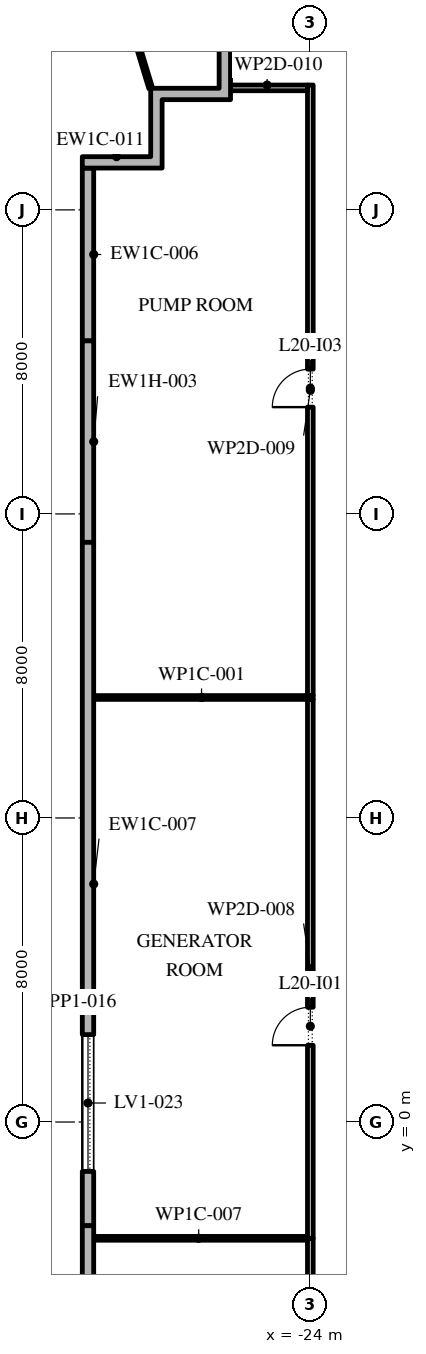
"""IFC4 building model, lengths in metres.
Left out: names, types, materials, properties, quantities, classifications, styles, units other than length and angle.
Written with IfcOpenShell. Run it as: python <this file> out.ifc"""

import sys

from ifc_helpers import new_model, si_unit, direction, frame, frame_2d, origin, place, context, subcontext, project, spatial, polyline, rectangle, outline, extrude, element, fill, save


model = new_model("IFC4")
c1 = context("Model", 3, precision=1e-05, world=origin(), true_north=direction((0.0, 1.0)))
c2 = subcontext(c1, "Body", "Model", "MODEL_VIEW")
j1 = project(units=[si_unit("LENGTHUNIT", "METRE"), si_unit("PLANEANGLEUNIT", "RADIAN")], contexts=[c1])
p1 = place(None, origin())
s1 = spatial("IfcSite", under=j1, at=p1, CompositionType="ELEMENT")
p2 = place(p1, origin())
s2 = spatial("IfcBuilding", under=s1, at=p2, CompositionType="ELEMENT")
p3 = place(p2, frame((0.0, 0.0, 94.2)))
s3 = spatial("IfcBuildingStorey", under=s2, at=p3, CompositionType="ELEMENT", Elevation=94.2)
p4 = place(p3, frame((-29.85, 25.1, 0.0), z_axis=(0.0, 0.0, 1.0), x_axis=(0.0, -1.0, 0.0)))
e1 = element("IfcWall", 1, at=p4, inside=s3, PredefinedType="STANDARD", context=c2, shape_type="SweptSolid", body=[
    extrude(rectangle(XDim=4.547, YDim=0.3, at=frame_2d((2.273, 0.0))), origin(), (0.0, 0.0, 1.0), 4.95),
])
p5 = place(p3, origin())
e2 = element("IfcWall", 2, at=p5, inside=s3, PredefinedType="STANDARD", context=c2, shape_type="SweptSolid", body=[
    extrude(outline(polyline([(-28.2, 25.4), (-28.2, 27.2), (-26.4, 27.2), (-26.4, 28.7), (-26.1, 28.7), (-26.1, 26.9), (-27.9, 26.9), (-27.9, 25.1), (-30.0, 25.1), (-30.0, 25.4), (-28.2, 25.4)])), origin(), (0.0, 0.0, 1.0), 4.95),
])
p6 = place(p3, frame((-28.2, 27.2, -0.05), z_axis=(0.0, 0.0, 1.0), x_axis=(-0.29036881155, 0.956914809834, 0.0)))
e3 = element("IfcWall", 3, at=p6, inside=s3, PredefinedType="STANDARD", context=c2, shape_type="SweptSolid", body=[
    extrude(rectangle(XDim=7.255, YDim=0.1, at=frame_2d((3.627, 0.0))), origin(), (0.0, 0.0, 1.0), 5.0),
])
p7 = place(p3, frame((-29.8, 11.17, 0.0), z_axis=(0.0, 0.0, 1.0), x_axis=(1.0, 0.0, 0.0)))
e4 = element("IfcWall", 4, at=p7, inside=s3, PredefinedType="PARTITIONING", context=c2, shape_type="SweptSolid", body=[
    extrude(rectangle(XDim=5.875, YDim=0.1, at=frame_2d((2.938, 0.0))), origin(), (0.0, 0.0, 1.0), 4.95),
])
p8 = place(p3, frame((-24.0, -10.12, 0.0), z_axis=(0.0, 0.0, 1.0), x_axis=(0.0, 1.0, 0.0)))
e5 = element("IfcWall", 5, at=p8, inside=s3, PredefinedType="PARTITIONING", context=c2, shape_type="SweptSolid", body=[
    extrude(rectangle(XDim=7.06, YDim=0.15, at=frame_2d((3.53, 0.0))), origin(), (0.0, 0.0, 1.0), 4.95),
])
p9 = place(p8, frame((1.66, 0.0, 0.0)))
e6 = element("IfcOpeningElement", 6, at=p9, cuts=e5, PredefinedType="OPENING", context=c2, shape_type="SweptSolid", body=[
    extrude(rectangle(XDim=1.0, YDim=2.1, at=frame_2d((0.5, 1.05))), frame((0.0, 0.085, 0.0), z_axis=(0.0, -1.0, 0.0), x_axis=(1.0, 0.0, 0.0)), (0.0, 0.0, 1.0), 0.17),
])
p10 = place(p3, frame((-24.075, -3.06, 0.0), z_axis=(0.0, 0.0, 1.0), x_axis=(-1.0, 0.0, 0.0)))
e7 = element("IfcWall", 7, at=p10, inside=s3, PredefinedType="PARTITIONING", context=c2, shape_type="SweptSolid", body=[
    extrude(rectangle(XDim=5.725, YDim=0.1, at=frame_2d((2.863, 0.0))), origin(), (0.0, 0.0, 1.0), 4.95),
])
p11 = place(p3, frame((-24.0, -3.06, 0.0), z_axis=(0.0, 0.0, 1.0), x_axis=(0.0, 1.0, 0.0)))
e8 = element("IfcWall", 8, at=p11, inside=s3, PredefinedType="PARTITIONING", context=c2, shape_type="SweptSolid", body=[
    extrude(rectangle(XDim=14.18, YDim=0.15, at=frame_2d((7.09, 0.0))), origin(), (0.0, 0.0, 1.0), 4.95),
])
p12 = place(p11, frame((5.08, 0.0, 0.0)))
e9 = element("IfcOpeningElement", 9, at=p12, cuts=e8, PredefinedType="OPENING", context=c2, shape_type="SweptSolid", body=[
    extrude(rectangle(XDim=1.0, YDim=2.1, at=frame_2d((0.5, 1.05))), frame((0.0, 0.085, 0.0), z_axis=(0.0, -1.0, 0.0), x_axis=(1.0, 0.0, 0.0)), (0.0, 0.0, 1.0), 0.17),
])
p13 = place(p3, frame((-24.0, 11.22, 0.0), z_axis=(0.0, 0.0, 1.0), x_axis=(0.0, 1.0, 0.0)))
e10 = element("IfcWall", 10, at=p13, inside=s3, PredefinedType="PARTITIONING", context=c2, shape_type="SweptSolid", body=[
    extrude(rectangle(XDim=16.065, YDim=0.15, at=frame_2d((8.032, 0.0))), origin(), (0.0, 0.0, 1.0), 4.95),
])
p14 = place(p13, frame((7.59, 0.0, 0.0)))
e11 = element("IfcOpeningElement", 11, at=p14, cuts=e10, PredefinedType="OPENING", context=c2, shape_type="SweptSolid", body=[
    extrude(rectangle(XDim=1.0, YDim=2.1, at=frame_2d((0.5, 1.05))), frame((0.0, 0.085, 0.0), z_axis=(0.0, -1.0, 0.0), x_axis=(1.0, 0.0, 0.0)), (0.0, 0.0, 1.0), 0.17),
])
p15 = place(p3, frame((-24.075, 27.21, 0.0), z_axis=(0.0, 0.0, 1.0), x_axis=(-1.0, 0.0, 0.0)))
e12 = element("IfcWall", 12, at=p15, inside=s3, PredefinedType="PARTITIONING", context=c2, shape_type="SweptSolid", body=[
    extrude(rectangle(XDim=2.125, YDim=0.15, at=frame_2d((1.062, 0.0))), origin(), (0.0, 0.0, 1.0), 4.95),
])
p16 = place(p3, frame((-29.85, 20.553, 0.0), z_axis=(0.0, 0.0, 1.0), x_axis=(0.0, -1.0, 0.0)))
e13 = element("IfcWall", 13, at=p16, inside=s3, PredefinedType="STANDARD", context=c2, shape_type="SweptSolid", body=[
    extrude(rectangle(XDim=5.301, YDim=0.3, at=frame_2d((2.65, 0.0))), origin(), (0.0, 0.0, 1.0), 4.05),
])
p17 = place(p3, frame((-29.85, 15.252, 0.0), z_axis=(0.0, 0.0, 1.0), x_axis=(0.0, -1.0, 0.0)))
e14 = element("IfcWall", 14, at=p17, inside=s3, PredefinedType="STANDARD", context=c2, shape_type="SweptSolid", body=[
    extrude(rectangle(XDim=17.981, YDim=0.3, at=frame_2d((8.99, 0.0))), origin(), (0.0, 0.0, 1.0), 4.95),
])
p18 = place(p17, frame((12.952, 0.0, 0.6)))
e15 = element("IfcOpeningElement", 15, at=p18, cuts=e14, PredefinedType="OPENING", context=c2, shape_type="SweptSolid", body=[
    extrude(rectangle(XDim=3.6, YDim=3.9, at=frame_2d((1.8, 1.95))), frame((0.0, 0.16, 0.0), z_axis=(0.0, -1.0, 0.0), x_axis=(1.0, 0.0, 0.0)), (0.0, 0.0, 1.0), 0.32),
])
p19 = place(p3, frame((-29.85, -2.729, 0.0), z_axis=(0.0, 0.0, 1.0), x_axis=(0.0, -1.0, 0.0)))
e16 = element("IfcWall", 16, at=p19, inside=s3, PredefinedType="STANDARD", context=c2, shape_type="SweptSolid", body=[
    extrude(rectangle(XDim=15.104, YDim=0.3, at=frame_2d((7.552, 0.0))), origin(), (0.0, 0.0, 1.0), 4.196),
])
p20 = place(p19, frame((2.086, 0.0, 0.6)))
e17 = element("IfcOpeningElement", 17, at=p20, cuts=e16, PredefinedType="OPENING", context=c2, shape_type="SweptSolid", body=[
    extrude(rectangle(XDim=3.6, YDim=3.475, at=frame_2d((1.8, 1.738))), frame((0.0, 0.16, 0.0), z_axis=(0.0, -1.0, 0.0), x_axis=(1.0, 0.0, 0.0)), (0.0, 0.0, 1.0), 0.32),
])
p21 = place(p19, frame((9.2, 0.0, 0.6)))
e18 = element("IfcOpeningElement", 18, at=p21, cuts=e16, PredefinedType="OPENING", context=c2, shape_type="SweptSolid", body=[
    extrude(rectangle(XDim=3.6, YDim=3.475, at=frame_2d((1.8, 1.738))), frame((0.0, 0.16, 0.0), z_axis=(0.0, -1.0, 0.0), x_axis=(1.0, 0.0, 0.0)), (0.0, 0.0, 1.0), 0.32),
])
p22 = place(p18, origin())
e19 = element("IfcWindow", 19, at=p22, inside=s3, PartitioningType="DOUBLE_PANEL_HORIZONTAL", PredefinedType="WINDOW", context=c2, shape_type="SweptSolid", body=[
    extrude(rectangle(XDim=3.6, YDim=3.9, at=frame_2d((1.8, 1.95))), frame((0.0, 0.03, 0.0), z_axis=(0.0, -1.0, 0.0), x_axis=(1.0, 0.0, 0.0)), (0.0, 0.0, 1.0), 0.06),
])
fill(e15, e19)
p23 = place(p12, origin())
e20 = element("IfcDoor", 20, at=p23, inside=s3, OperationType="SINGLE_SWING_RIGHT", PredefinedType="DOOR", context=c2, shape_type="SweptSolid", body=[
    extrude(rectangle(XDim=1.0, YDim=2.1, at=frame_2d((0.5, 1.05))), frame((0.0, 0.025, 0.0), z_axis=(0.0, -1.0, 0.0), x_axis=(1.0, 0.0, 0.0)), (0.0, 0.0, 1.0), 0.05),
])
fill(e9, e20)
p24 = place(p14, origin())
e21 = element("IfcDoor", 21, at=p24, inside=s3, OperationType="SINGLE_SWING_RIGHT", PredefinedType="DOOR", context=c2, shape_type="SweptSolid", body=[
    extrude(rectangle(XDim=1.0, YDim=2.1, at=frame_2d((0.5, 1.05))), frame((0.0, 0.025, 0.0), z_axis=(0.0, -1.0, 0.0), x_axis=(1.0, 0.0, 0.0)), (0.0, 0.0, 1.0), 0.05),
])
fill(e11, e21)
save(model, sys.argv[1])
